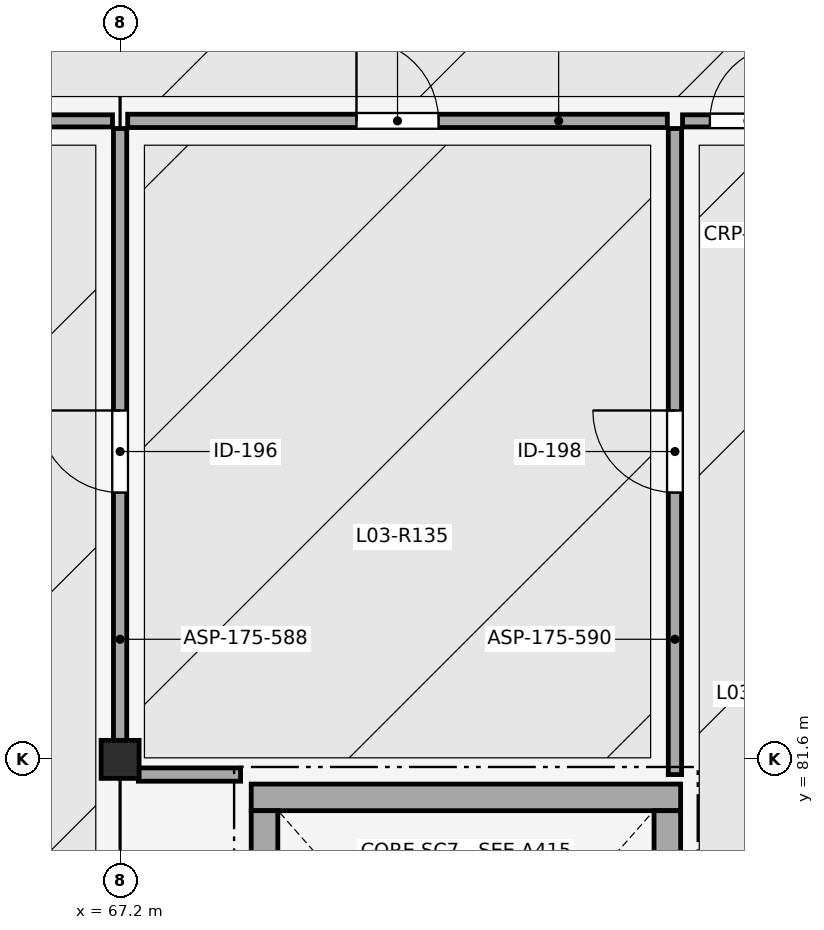
"""IFC4 building model, lengths in metres.
Left out: names, types, materials, properties, quantities, classifications, styles, units other than length and angle.
Written with IfcOpenShell. Run it as: python <this file> out.ifc"""

import sys

from ifc_helpers import new_model, si_unit, direction, frame, frame_2d, origin, origin_2d, place, context, subcontext, project, spatial, rectangle, extrude, element, fill, save


model = new_model("IFC4")
c1 = context("Model", 3, precision=1e-05, world=origin(), true_north=direction((0.0, 1.0)))
c2 = subcontext(c1, "Body", "Model", "MODEL_VIEW")
j1 = project(units=[si_unit("LENGTHUNIT", "METRE"), si_unit("PLANEANGLEUNIT", "RADIAN")], contexts=[c1])
p1 = place(None, origin())
s1 = spatial("IfcSite", under=j1, at=p1, CompositionType="ELEMENT")
p2 = place(p1, origin())
s2 = spatial("IfcBuilding", under=s1, at=p2, CompositionType="ELEMENT")
p3 = place(p2, frame((0.0, 0.0, 14.1)))
s3 = spatial("IfcBuildingStorey", under=s2, at=p3, CompositionType="ELEMENT", Elevation=14.1)
p4 = place(p3, frame((67.2, 81.6, 0.0), z_axis=(0.0, 0.0, 1.0), x_axis=(1.0, 0.0, 0.0)))
e1 = element("IfcColumn", 1, at=p4, inside=s3, PredefinedType="COLUMN", context=c2, shape_type="SweptSolid", body=[
    extrude(rectangle(XDim=0.5, YDim=0.5, at=origin_2d()), origin(), (0.0, 0.0, 1.0), 4.5),
])
p5 = place(p3, frame((68.925, 81.1, 0.0), z_axis=(0.0, 0.0, 1.0), x_axis=(1.0, 0.0, 0.0)))
e2 = element("IfcWall", 2, at=p5, inside=s3, PredefinedType="SHEAR", context=c2, shape_type="SweptSolid", body=[
    extrude(rectangle(XDim=5.65, YDim=0.35, at=frame_2d((2.825, 0.0))), origin(), (0.0, 0.0, 1.0), 3.65),
])
p6 = place(p3, frame((69.1, 72.975, 0.0), z_axis=(0.0, 0.0, 1.0), x_axis=(0.0, 1.0, 0.0)))
e3 = element("IfcWall", 3, at=p6, inside=s3, PredefinedType="SHEAR", context=c2, shape_type="SweptSolid", body=[
    extrude(rectangle(XDim=7.95, YDim=0.35, at=frame_2d((3.975, 0.0))), origin(), (0.0, 0.0, 1.0), 3.65),
])
p7 = place(p3, frame((74.4, 80.925, 0.0), z_axis=(0.0, 0.0, 1.0), x_axis=(0.0, -1.0, 0.0)))
e4 = element("IfcWall", 4, at=p7, inside=s3, PredefinedType="SHEAR", context=c2, shape_type="SweptSolid", body=[
    extrude(rectangle(XDim=7.95, YDim=0.35, at=frame_2d((3.975, 0.0))), origin(), (0.0, 0.0, 1.0), 3.65),
])
p8 = place(p7, frame((5.68, 0.0, 0.0)))
e5 = element("IfcOpeningElement", 5, at=p8, cuts=e4, PredefinedType="OPENING", context=c2, shape_type="SweptSolid", body=[
    extrude(rectangle(XDim=2.05, YDim=2.15, at=frame_2d((1.025, 1.075))), frame((0.0, 0.185, 0.0), z_axis=(0.0, -1.0, 0.0), x_axis=(1.0, 0.0, 0.0)), (0.0, 0.0, 1.0), 0.37),
])
p9 = place(p3, frame((67.2, 81.4, 0.0), z_axis=(0.0, 0.0, 1.0), x_axis=(0.0, 1.0, 0.0)))
e6 = element("IfcWall", 6, at=p9, inside=s3, PredefinedType="PARTITIONING", context=c2, shape_type="SweptSolid", body=[
    extrude(rectangle(XDim=8.5, YDim=0.175, at=frame_2d((4.25, 0.0))), origin(), (0.0, 0.0, 1.0), 3.1),
])
p10 = place(p9, frame((3.71, 0.0, 0.0)))
e7 = element("IfcOpeningElement", 7, at=p10, cuts=e6, PredefinedType="OPENING", context=c2, shape_type="SweptSolid", body=[
    extrude(rectangle(XDim=1.08, YDim=2.18, at=frame_2d((0.54, 1.09))), frame((0.0, 0.097, 0.0), z_axis=(0.0, -1.0, 0.0), x_axis=(1.0, 0.0, 0.0)), (0.0, 0.0, 1.0), 0.195),
])
p11 = place(p3, frame((55.8, 90.0, 0.0), z_axis=(0.0, 0.0, 1.0), x_axis=(1.0, 0.0, 0.0)))
e8 = element("IfcWall", 8, at=p11, inside=s3, PredefinedType="PARTITIONING", context=c2, shape_type="SweptSolid", body=[
    extrude(rectangle(XDim=11.3, YDim=0.16, at=frame_2d((5.65, 0.0))), origin(), (0.0, 0.0, 1.0), 3.1),
])
p12 = place(p11, frame((4.75, 0.0, 0.0)))
e9 = element("IfcOpeningElement", 9, at=p12, cuts=e8, PredefinedType="OPENING", context=c2, shape_type="SweptSolid", body=[
    extrude(rectangle(XDim=1.8, YDim=2.15, at=frame_2d((0.9, 1.075))), frame((0.0, 0.09, 0.0), z_axis=(0.0, -1.0, 0.0), x_axis=(1.0, 0.0, 0.0)), (0.0, 0.0, 1.0), 0.18),
])
p13 = place(p3, frame((74.5, 81.4, 0.0), z_axis=(0.0, 0.0, 1.0), x_axis=(0.0, 1.0, 0.0)))
e10 = element("IfcWall", 10, at=p13, inside=s3, PredefinedType="PARTITIONING", context=c2, shape_type="SweptSolid", body=[
    extrude(rectangle(XDim=8.5, YDim=0.175, at=frame_2d((4.25, 0.0))), origin(), (0.0, 0.0, 1.0), 3.1),
])
p14 = place(p13, frame((3.71, 0.0, 0.0)))
e11 = element("IfcOpeningElement", 11, at=p14, cuts=e10, PredefinedType="OPENING", context=c2, shape_type="SweptSolid", body=[
    extrude(rectangle(XDim=1.08, YDim=2.18, at=frame_2d((0.54, 1.09))), frame((0.0, 0.097, 0.0), z_axis=(0.0, -1.0, 0.0), x_axis=(1.0, 0.0, 0.0)), (0.0, 0.0, 1.0), 0.195),
])
p15 = place(p3, frame((74.6, 90.0, 0.0), z_axis=(0.0, 0.0, 1.0), x_axis=(1.0, 0.0, 0.0)))
e12 = element("IfcWall", 12, at=p15, inside=s3, PredefinedType="PARTITIONING", context=c2, shape_type="SweptSolid", body=[
    extrude(rectangle(XDim=2.1, YDim=0.16, at=frame_2d((1.05, 0.0))), origin(), (0.0, 0.0, 1.0), 3.1),
])
p16 = place(p15, frame((0.36, 0.0, 0.0)))
e13 = element("IfcOpeningElement", 13, at=p16, cuts=e12, PredefinedType="OPENING", context=c2, shape_type="SweptSolid", body=[
    extrude(rectangle(XDim=1.0, YDim=2.15, at=frame_2d((0.5, 1.075))), frame((0.0, 0.09, 0.0), z_axis=(0.0, -1.0, 0.0), x_axis=(1.0, 0.0, 0.0)), (0.0, 0.0, 1.0), 0.18),
])
p17 = place(p3, frame((67.3, 90.0, 0.0), z_axis=(0.0, 0.0, 1.0), x_axis=(1.0, 0.0, 0.0)))
e14 = element("IfcWall", 14, at=p17, inside=s3, PredefinedType="PARTITIONING", context=c2, shape_type="SweptSolid", body=[
    extrude(rectangle(XDim=7.1, YDim=0.175, at=frame_2d((3.55, 0.0))), origin(), (0.0, 0.0, 1.0), 3.1),
])
p18 = place(p17, frame((3.01, 0.0, 0.0)))
e15 = element("IfcOpeningElement", 15, at=p18, cuts=e14, PredefinedType="OPENING", context=c2, shape_type="SweptSolid", body=[
    extrude(rectangle(XDim=1.08, YDim=2.18, at=frame_2d((0.54, 1.09))), frame((0.0, 0.097, 0.0), z_axis=(0.0, -1.0, 0.0), x_axis=(1.0, 0.0, 0.0)), (0.0, 0.0, 1.0), 0.195),
])
p19 = place(p3, frame((67.44, 81.4, 0.0), z_axis=(0.0, 0.0, 1.0), x_axis=(1.0, 0.0, 0.0)))
e16 = element("IfcWall", 16, at=p19, inside=s3, PredefinedType="PARTITIONING", context=c2, shape_type="SweptSolid", body=[
    extrude(rectangle(XDim=1.345, YDim=0.175, at=frame_2d((0.672, 0.0))), origin(), (0.0, 0.0, 1.0), 3.1),
])
p20 = place(p10, origin())
e17 = element("IfcDoor", 17, at=p20, inside=s3, OperationType="SINGLE_SWING_RIGHT", PredefinedType="DOOR", context=c2, shape_type="SweptSolid", body=[
    extrude(rectangle(XDim=1.08, YDim=2.18, at=frame_2d((0.54, 1.09))), frame((0.0, 0.025, 0.0), z_axis=(0.0, -1.0, 0.0), x_axis=(1.0, 0.0, 0.0)), (0.0, 0.0, 1.0), 0.05),
])
fill(e7, e17)
p21 = place(p14, origin())
e18 = element("IfcDoor", 18, at=p21, inside=s3, OperationType="SINGLE_SWING_RIGHT", PredefinedType="DOOR", context=c2, shape_type="SweptSolid", body=[
    extrude(rectangle(XDim=1.08, YDim=2.18, at=frame_2d((0.54, 1.09))), frame((0.0, 0.025, 0.0), z_axis=(0.0, -1.0, 0.0), x_axis=(1.0, 0.0, 0.0)), (0.0, 0.0, 1.0), 0.05),
])
fill(e11, e18)
p22 = place(p16, origin())
e19 = element("IfcDoor", 19, at=p22, inside=s3, OperationType="SINGLE_SWING_RIGHT", PredefinedType="DOOR", context=c2, shape_type="SweptSolid", body=[
    extrude(rectangle(XDim=1.0, YDim=2.15, at=frame_2d((0.5, 1.075))), frame((0.0, 0.025, 0.0), z_axis=(0.0, -1.0, 0.0), x_axis=(1.0, 0.0, 0.0)), (0.0, 0.0, 1.0), 0.05),
])
fill(e13, e19)
p23 = place(p18, origin())
e20 = element("IfcDoor", 20, at=p23, inside=s3, OperationType="SINGLE_SWING_LEFT", PredefinedType="DOOR", context=c2, shape_type="SweptSolid", body=[
    extrude(rectangle(XDim=1.08, YDim=2.18, at=frame_2d((0.54, 1.09))), frame((0.0, 0.025, 0.0), z_axis=(0.0, -1.0, 0.0), x_axis=(1.0, 0.0, 0.0)), (0.0, 0.0, 1.0), 0.05),
])
fill(e15, e20)
save(model, sys.argv[1])
